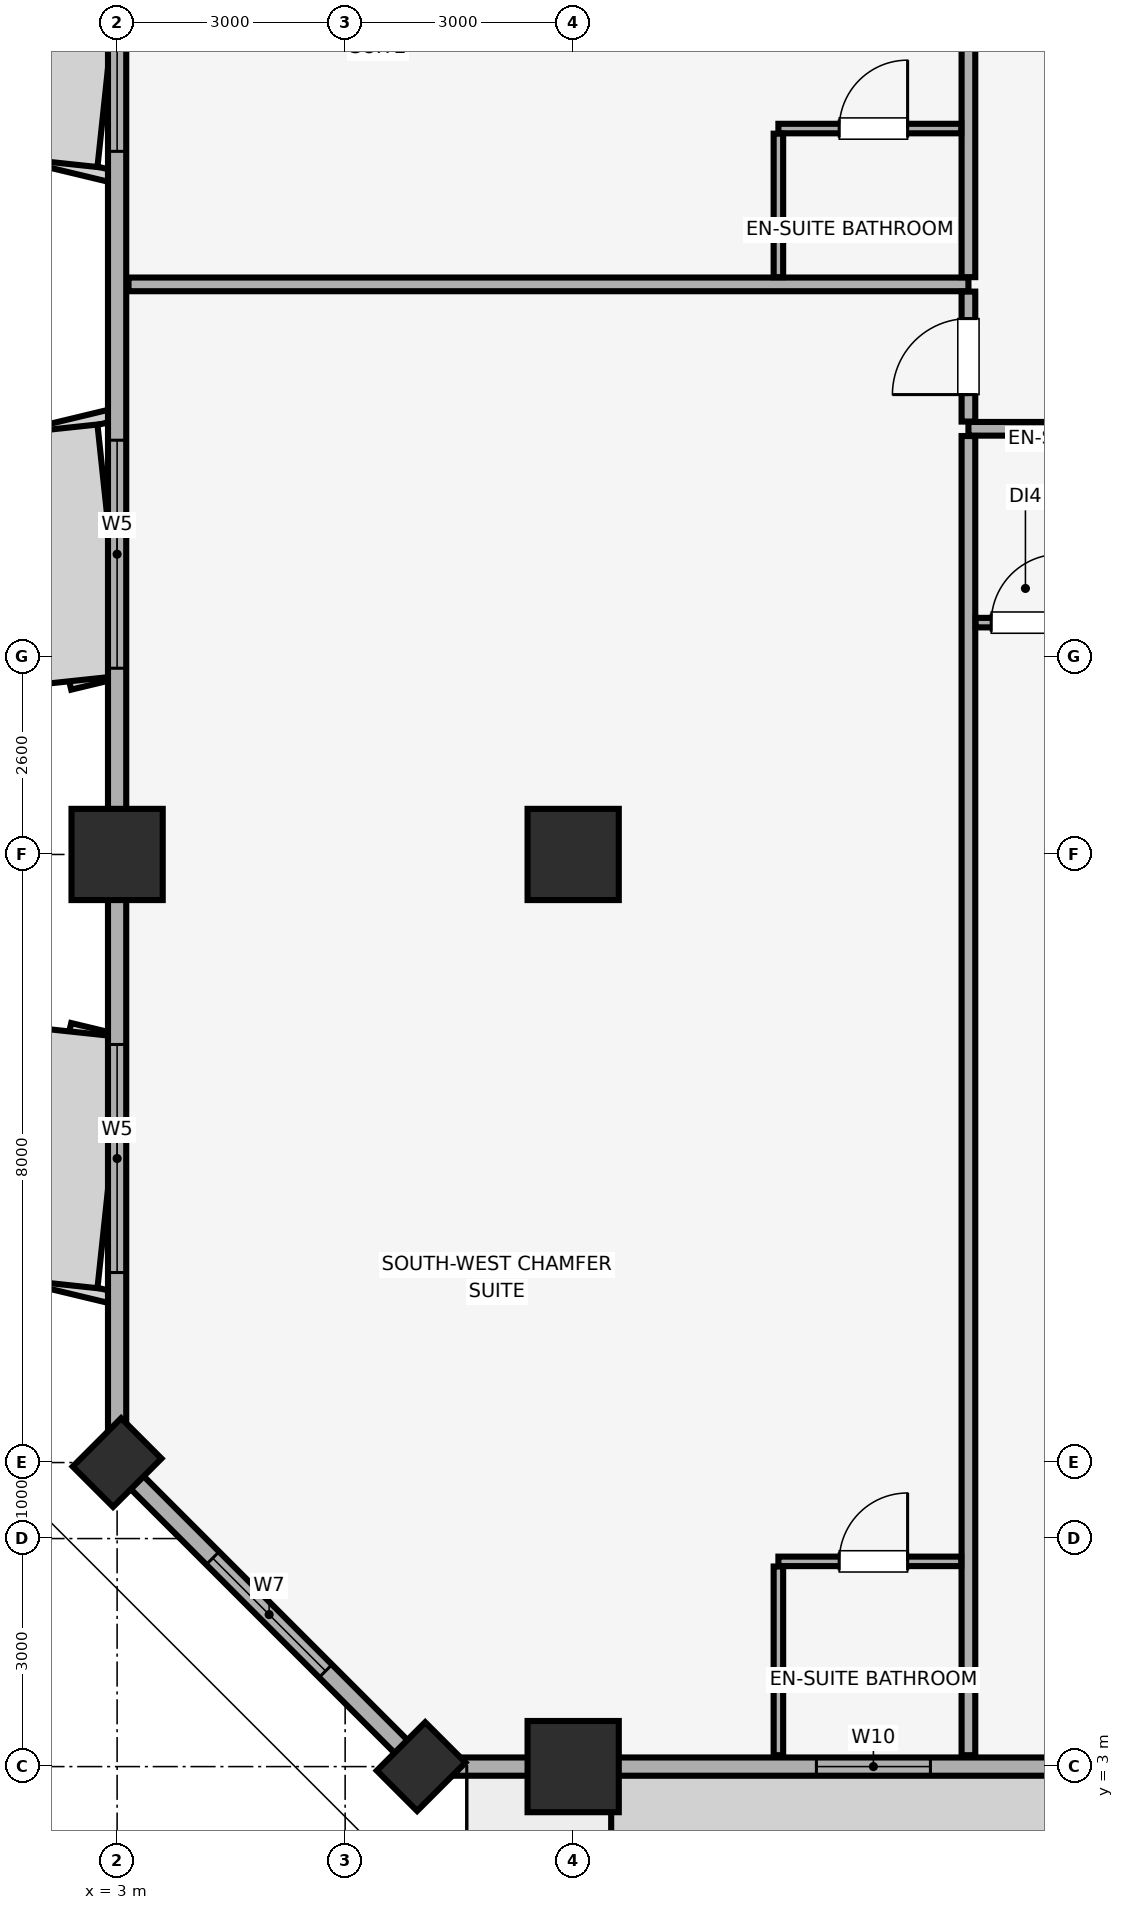
"""IFC4 building model, lengths in metres.
Left out: names, types, materials, properties, quantities, classifications, styles, units other than length and angle.
Written with IfcOpenShell. Run it as: python <this file> out.ifc"""

import sys

from ifc_helpers import new_model, si_unit, direction, frame, frame_2d, origin, origin_2d, place, context, subcontext, project, spatial, rectangle, extrude, element, fill, save


model = new_model("IFC4")
c1 = context("Model", 3, precision=1e-05, world=origin(), true_north=direction((0.0, 1.0)))
c2 = subcontext(c1, "Body", "Model", "MODEL_VIEW")
j1 = project(units=[si_unit("LENGTHUNIT", "METRE"), si_unit("PLANEANGLEUNIT", "RADIAN")], contexts=[c1])
p1 = place(None, origin())
s1 = spatial("IfcSite", under=j1, at=p1, CompositionType="ELEMENT")
p2 = place(p1, origin())
s2 = spatial("IfcBuilding", under=s1, at=p2, CompositionType="ELEMENT")
p3 = place(p2, frame((0.0, 0.0, 180.95)))
s3 = spatial("IfcBuildingStorey", under=s2, at=p3, CompositionType="ELEMENT", Elevation=180.95)
for number, where, z_axis, x_axis in (
    (1, (9.0, 3.0, 0.0), (0.0, 0.0, 1.0), (1.0, 0.0, 0.0)),
    (2, (3.0, 15.0, 0.0), (0.0, 0.0, 1.0), (1.0, 0.0, 0.0)),
):
    element("IfcColumn", number, at=place(p3, frame(where, z_axis=z_axis, x_axis=x_axis)), inside=s3, PredefinedType="COLUMN", context=c2, shape_type="SweptSolid", body=[
        extrude(rectangle(XDim=1.2, YDim=1.2, at=origin_2d()), origin(), (0.0, 0.0, 1.0), 3.45),
    ])
for number, where, z_axis, x_axis in (
    (3, (7.0, 3.0, 0.0), (0.0, 0.0, 1.0), (0.707, 0.707, 0.0)),
    (4, (3.0, 7.0, 0.0), (0.0, 0.0, 1.0), (0.707, 0.707, 0.0)),
):
    element("IfcColumn", number, at=place(p3, frame(where, z_axis=z_axis, x_axis=x_axis)), inside=s3, PredefinedType="PILASTER", context=c2, shape_type="SweptSolid", body=[
        extrude(rectangle(XDim=0.9, YDim=0.75, at=origin_2d()), origin(), (0.0, 0.0, 1.0), 3.45),
    ])
p4 = place(p3, frame((9.0, 15.0, 0.0), z_axis=(0.0, 0.0, 1.0), x_axis=(1.0, 0.0, 0.0)))
e5 = element("IfcColumn", 5, at=p4, inside=s3, PredefinedType="COLUMN", context=c2, shape_type="SweptSolid", body=[
    extrude(rectangle(XDim=1.2, YDim=1.2, at=origin_2d()), origin(), (0.0, 0.0, 1.0), 3.45),
])
p5 = place(p3, frame((7.0, 3.0, 0.0), z_axis=(0.0, 0.0, 1.0), x_axis=(1.0, 0.0, 0.0)))
e6 = element("IfcWall", 6, at=p5, inside=s3, PredefinedType="SOLIDWALL", context=c2, shape_type="SweptSolid", body=[
    extrude(rectangle(XDim=70.0, YDim=0.24, at=frame_2d((35.0, 0.0))), origin(), (0.0, 0.0, 1.0), 2.65),
])
p6 = place(p5, frame((11.383, 0.0, 0.0)))
e7 = element("IfcOpeningElement", 7, at=p6, cuts=e6, PredefinedType="OPENING", context=c2, shape_type="SweptSolid", body=[
    extrude(rectangle(XDim=1.1, YDim=2.15, at=frame_2d((0.55, 1.075))), frame((0.0, 0.13, 0.0), z_axis=(0.0, -1.0, 0.0), x_axis=(1.0, 0.0, 0.0)), (0.0, 0.0, 1.0), 0.26),
])
p7 = place(p5, frame((34.45, 0.0, 0.0)))
e8 = element("IfcOpeningElement", 8, at=p7, cuts=e6, PredefinedType="OPENING", context=c2, shape_type="SweptSolid", body=[
    extrude(rectangle(XDim=1.1, YDim=2.15, at=frame_2d((0.55, 1.075))), frame((0.0, 0.13, 0.0), z_axis=(0.0, -1.0, 0.0), x_axis=(1.0, 0.0, 0.0)), (0.0, 0.0, 1.0), 0.26),
])
p8 = place(p5, frame((57.517, 0.0, 0.0)))
e9 = element("IfcOpeningElement", 9, at=p8, cuts=e6, PredefinedType="OPENING", context=c2, shape_type="SweptSolid", body=[
    extrude(rectangle(XDim=1.1, YDim=2.15, at=frame_2d((0.55, 1.075))), frame((0.0, 0.13, 0.0), z_axis=(0.0, -1.0, 0.0), x_axis=(1.0, 0.0, 0.0)), (0.0, 0.0, 1.0), 0.26),
])
p9 = place(p5, frame((5.2, 0.0, 0.85)))
e10 = element("IfcOpeningElement", 10, at=p9, cuts=e6, PredefinedType="OPENING", context=c2, shape_type="SweptSolid", body=[
    extrude(rectangle(XDim=1.5, YDim=1.4, at=frame_2d((0.75, 0.7))), frame((0.0, 0.13, 0.0), z_axis=(0.0, -1.0, 0.0), x_axis=(1.0, 0.0, 0.0)), (0.0, 0.0, 1.0), 0.26),
])
p10 = place(p5, frame((13.133, 0.0, 0.85)))
e11 = element("IfcOpeningElement", 11, at=p10, cuts=e6, PredefinedType="OPENING", context=c2, shape_type="SweptSolid", body=[
    extrude(rectangle(XDim=1.5, YDim=1.4, at=frame_2d((0.75, 0.7))), frame((0.0, 0.13, 0.0), z_axis=(0.0, -1.0, 0.0), x_axis=(1.0, 0.0, 0.0)), (0.0, 0.0, 1.0), 0.26),
])
p11 = place(p5, frame((17.812, 0.0, 0.85)))
e12 = element("IfcOpeningElement", 12, at=p11, cuts=e6, PredefinedType="OPENING", context=c2, shape_type="SweptSolid", body=[
    extrude(rectangle(XDim=4.2, YDim=1.65, at=frame_2d((2.1, 0.825))), frame((0.0, 0.13, 0.0), z_axis=(0.0, -1.0, 0.0), x_axis=(1.0, 0.0, 0.0)), (0.0, 0.0, 1.0), 0.26),
])
p12 = place(p5, frame((25.1, 0.0, 0.85)))
e13 = element("IfcOpeningElement", 13, at=p12, cuts=e6, PredefinedType="OPENING", context=c2, shape_type="SweptSolid", body=[
    extrude(rectangle(XDim=4.2, YDim=1.65, at=frame_2d((2.1, 0.825))), frame((0.0, 0.13, 0.0), z_axis=(0.0, -1.0, 0.0), x_axis=(1.0, 0.0, 0.0)), (0.0, 0.0, 1.0), 0.26),
])
p13 = place(p5, frame((31.99, 0.0, 0.85)))
e14 = element("IfcOpeningElement", 14, at=p13, cuts=e6, PredefinedType="OPENING", context=c2, shape_type="SweptSolid", body=[
    extrude(rectangle(XDim=1.5, YDim=1.4, at=frame_2d((0.75, 0.7))), frame((0.0, 0.13, 0.0), z_axis=(0.0, -1.0, 0.0), x_axis=(1.0, 0.0, 0.0)), (0.0, 0.0, 1.0), 0.26),
])
p14 = place(p5, frame((36.51, 0.0, 0.85)))
e15 = element("IfcOpeningElement", 15, at=p14, cuts=e6, PredefinedType="OPENING", context=c2, shape_type="SweptSolid", body=[
    extrude(rectangle(XDim=1.5, YDim=1.4, at=frame_2d((0.75, 0.7))), frame((0.0, 0.13, 0.0), z_axis=(0.0, -1.0, 0.0), x_axis=(1.0, 0.0, 0.0)), (0.0, 0.0, 1.0), 0.26),
])
p15 = place(p5, frame((40.7, 0.0, 0.85)))
e16 = element("IfcOpeningElement", 16, at=p15, cuts=e6, PredefinedType="OPENING", context=c2, shape_type="SweptSolid", body=[
    extrude(rectangle(XDim=4.2, YDim=1.65, at=frame_2d((2.1, 0.825))), frame((0.0, 0.13, 0.0), z_axis=(0.0, -1.0, 0.0), x_axis=(1.0, 0.0, 0.0)), (0.0, 0.0, 1.0), 0.26),
])
p16 = place(p5, frame((47.9, 0.0, 0.85)))
e17 = element("IfcOpeningElement", 17, at=p16, cuts=e6, PredefinedType="OPENING", context=c2, shape_type="SweptSolid", body=[
    extrude(rectangle(XDim=4.2, YDim=1.65, at=frame_2d((2.1, 0.825))), frame((0.0, 0.13, 0.0), z_axis=(0.0, -1.0, 0.0), x_axis=(1.0, 0.0, 0.0)), (0.0, 0.0, 1.0), 0.26),
])
p17 = place(p5, frame((55.314, 0.0, 0.85)))
e18 = element("IfcOpeningElement", 18, at=p17, cuts=e6, PredefinedType="OPENING", context=c2, shape_type="SweptSolid", body=[
    extrude(rectangle(XDim=1.5, YDim=1.4, at=frame_2d((0.75, 0.7))), frame((0.0, 0.13, 0.0), z_axis=(0.0, -1.0, 0.0), x_axis=(1.0, 0.0, 0.0)), (0.0, 0.0, 1.0), 0.26),
])
p18 = place(p5, frame((63.3, 0.0, 0.85)))
e19 = element("IfcOpeningElement", 19, at=p18, cuts=e6, PredefinedType="OPENING", context=c2, shape_type="SweptSolid", body=[
    extrude(rectangle(XDim=1.5, YDim=1.4, at=frame_2d((0.75, 0.7))), frame((0.0, 0.13, 0.0), z_axis=(0.0, -1.0, 0.0), x_axis=(1.0, 0.0, 0.0)), (0.0, 0.0, 1.0), 0.26),
])
p19 = place(p3, frame((3.0, 45.0, 0.0), z_axis=(0.0, 0.0, 1.0), x_axis=(0.0, -1.0, 0.0)))
e20 = element("IfcWall", 20, at=p19, inside=s3, PredefinedType="SOLIDWALL", context=c2, shape_type="SweptSolid", body=[
    extrude(rectangle(XDim=38.0, YDim=0.24, at=frame_2d((19.0, 0.0))), origin(), (0.0, 0.0, 1.0), 2.65),
])
p20 = place(p19, frame((32.5, 0.0, 0.85)))
e21 = element("IfcOpeningElement", 21, at=p20, cuts=e20, PredefinedType="OPENING", context=c2, shape_type="SweptSolid", body=[
    extrude(rectangle(XDim=3.0, YDim=1.5, at=frame_2d((1.5, 0.75))), frame((0.0, 0.13, 0.0), z_axis=(0.0, -1.0, 0.0), x_axis=(1.0, 0.0, 0.0)), (0.0, 0.0, 1.0), 0.26),
])
p21 = place(p19, frame((24.55, 0.0, 0.85)))
e22 = element("IfcOpeningElement", 22, at=p21, cuts=e20, PredefinedType="OPENING", context=c2, shape_type="SweptSolid", body=[
    extrude(rectangle(XDim=3.0, YDim=1.5, at=frame_2d((1.5, 0.75))), frame((0.0, 0.13, 0.0), z_axis=(0.0, -1.0, 0.0), x_axis=(1.0, 0.0, 0.0)), (0.0, 0.0, 1.0), 0.26),
])
p22 = place(p19, frame((17.75, 0.0, 0.85)))
e23 = element("IfcOpeningElement", 23, at=p22, cuts=e20, PredefinedType="OPENING", context=c2, shape_type="SweptSolid", body=[
    extrude(rectangle(XDim=3.0, YDim=1.5, at=frame_2d((1.5, 0.75))), frame((0.0, 0.13, 0.0), z_axis=(0.0, -1.0, 0.0), x_axis=(1.0, 0.0, 0.0)), (0.0, 0.0, 1.0), 0.26),
])
p23 = place(p19, frame((9.85, 0.0, 0.85)))
e24 = element("IfcOpeningElement", 24, at=p23, cuts=e20, PredefinedType="OPENING", context=c2, shape_type="SweptSolid", body=[
    extrude(rectangle(XDim=3.0, YDim=1.5, at=frame_2d((1.5, 0.75))), frame((0.0, 0.13, 0.0), z_axis=(0.0, -1.0, 0.0), x_axis=(1.0, 0.0, 0.0)), (0.0, 0.0, 1.0), 0.26),
])
p24 = place(p19, frame((1.085, 0.0, 0.85)))
e25 = element("IfcOpeningElement", 25, at=p24, cuts=e20, PredefinedType="OPENING", context=c2, shape_type="SweptSolid", body=[
    extrude(rectangle(XDim=3.0, YDim=1.5, at=frame_2d((1.5, 0.75))), frame((0.0, 0.13, 0.0), z_axis=(0.0, -1.0, 0.0), x_axis=(1.0, 0.0, 0.0)), (0.0, 0.0, 1.0), 0.26),
])
p25 = place(p3, frame((3.0, 7.0, 0.0), z_axis=(0.0, 0.0, 1.0), x_axis=(0.707106781187, -0.707106781187, 0.0)))
e26 = element("IfcWall", 26, at=p25, inside=s3, PredefinedType="SOLIDWALL", context=c2, shape_type="SweptSolid", body=[
    extrude(rectangle(XDim=5.657, YDim=0.24, at=frame_2d((2.828, 0.0))), origin(), (0.0, 0.0, 1.0), 2.65),
])
p26 = place(p25, frame((1.778, 0.0, 0.85)))
e27 = element("IfcOpeningElement", 27, at=p26, cuts=e26, PredefinedType="OPENING", context=c2, shape_type="SweptSolid", body=[
    extrude(rectangle(XDim=2.1, YDim=1.6, at=frame_2d((1.05, 0.8))), frame((0.0, 0.13, 0.0), z_axis=(0.0, -1.0, 0.0), x_axis=(1.0, 0.0, 0.0)), (0.0, 0.0, 1.0), 0.26),
])
p27 = place(p3, frame((14.2, 20.6, 0.0), z_axis=(0.0, 0.0, 1.0), x_axis=(1.0, 0.0, 0.0)))
e28 = element("IfcWall", 28, at=p27, inside=s3, PredefinedType="PARTITIONING", context=c2, shape_type="SweptSolid", body=[
    extrude(rectangle(XDim=7.912, YDim=0.18, at=frame_2d((3.956, 0.0))), origin(), (0.0, 0.0, 1.0), 3.45),
])
p28 = place(p27, frame((5.156, 0.0, 0.0)))
e29 = element("IfcOpeningElement", 29, at=p28, cuts=e28, PredefinedType="OPENING", context=c2, shape_type="SweptSolid", body=[
    extrude(rectangle(XDim=1.0, YDim=2.15, at=frame_2d((0.5, 1.075))), frame((0.0, 0.1, 0.0), z_axis=(0.0, -1.0, 0.0), x_axis=(1.0, 0.0, 0.0)), (0.0, 0.0, 1.0), 0.2),
])
p29 = place(p3, frame((14.2, 3.15, 0.0), z_axis=(0.0, 0.0, 1.0), x_axis=(0.0, 1.0, 0.0)))
e30 = element("IfcWall", 30, at=p29, inside=s3, PredefinedType="PARTITIONING", context=c2, shape_type="SweptSolid", body=[
    extrude(rectangle(XDim=17.355, YDim=0.18, at=frame_2d((8.677, 0.0))), origin(), (0.0, 0.0, 1.0), 3.45),
])
p30 = place(p3, frame((14.295, 18.05, 0.0), z_axis=(0.0, 0.0, 1.0), x_axis=(1.0, 0.0, 0.0)))
e31 = element("IfcWall", 31, at=p30, inside=s3, PredefinedType="PARTITIONING", context=c2, shape_type="SweptSolid", body=[
    extrude(rectangle(XDim=2.405, YDim=0.125, at=frame_2d((1.203, 0.0))), origin(), (0.0, 0.0, 1.0), 3.45),
])
p31 = place(p30, frame((0.205, 0.0, 0.0)))
e32 = element("IfcOpeningElement", 32, at=p31, cuts=e31, PredefinedType="OPENING", context=c2, shape_type="SweptSolid", body=[
    extrude(rectangle(XDim=0.9, YDim=2.1, at=frame_2d((0.45, 1.05))), frame((0.0, 0.073, 0.0), z_axis=(0.0, -1.0, 0.0), x_axis=(1.0, 0.0, 0.0)), (0.0, 0.0, 1.0), 0.145),
])
p32 = place(p3, frame((3.15, 22.5, 0.0), z_axis=(0.0, 0.0, 1.0), x_axis=(1.0, 0.0, 0.0)))
e33 = element("IfcWall", 33, at=p32, inside=s3, PredefinedType="PARTITIONING", context=c2, shape_type="SweptSolid", body=[
    extrude(rectangle(XDim=11.05, YDim=0.18, at=frame_2d((5.525, 0.0))), origin(), (0.0, 0.0, 1.0), 3.45),
])
p33 = place(p3, frame((14.2, 20.695, 0.0), z_axis=(0.0, 0.0, 1.0), x_axis=(0.0, 1.0, 0.0)))
e34 = element("IfcWall", 34, at=p33, inside=s3, PredefinedType="PARTITIONING", context=c2, shape_type="SweptSolid", body=[
    extrude(rectangle(XDim=1.71, YDim=0.18, at=frame_2d((0.855, 0.0))), origin(), (0.0, 0.0, 1.0), 3.45),
])
p34 = place(p33, frame((0.355, 0.0, 0.0)))
e35 = element("IfcOpeningElement", 35, at=p34, cuts=e34, PredefinedType="OPENING", context=c2, shape_type="SweptSolid", body=[
    extrude(rectangle(XDim=1.0, YDim=2.15, at=frame_2d((0.5, 1.075))), frame((0.0, 0.1, 0.0), z_axis=(0.0, -1.0, 0.0), x_axis=(1.0, 0.0, 0.0)), (0.0, 0.0, 1.0), 0.2),
])
p35 = place(p3, frame((11.7, 5.7, 0.0), z_axis=(0.0, 0.0, 1.0), x_axis=(1.0, 0.0, 0.0)))
e36 = element("IfcWall", 36, at=p35, inside=s3, PredefinedType="PARTITIONING", context=c2, shape_type="SweptSolid", body=[
    extrude(rectangle(XDim=2.405, YDim=0.125, at=frame_2d((1.203, 0.0))), origin(), (0.0, 0.0, 1.0), 3.45),
])
p36 = place(p35, frame((0.8, 0.0, 0.0)))
e37 = element("IfcOpeningElement", 37, at=p36, cuts=e36, PredefinedType="OPENING", context=c2, shape_type="SweptSolid", body=[
    extrude(rectangle(XDim=0.9, YDim=2.1, at=frame_2d((0.45, 1.05))), frame((0.0, 0.073, 0.0), z_axis=(0.0, -1.0, 0.0), x_axis=(1.0, 0.0, 0.0)), (0.0, 0.0, 1.0), 0.145),
])
p37 = place(p3, frame((11.7, 3.15, 0.0), z_axis=(0.0, 0.0, 1.0), x_axis=(0.0, 1.0, 0.0)))
e38 = element("IfcWall", 38, at=p37, inside=s3, PredefinedType="PARTITIONING", context=c2, shape_type="SweptSolid", body=[
    extrude(rectangle(XDim=2.483, YDim=0.125, at=frame_2d((1.241, 0.0))), origin(), (0.0, 0.0, 1.0), 3.45),
])
p38 = place(p3, frame((14.2, 22.595, 0.0), z_axis=(0.0, 0.0, 1.0), x_axis=(0.0, 1.0, 0.0)))
e39 = element("IfcWall", 39, at=p38, inside=s3, PredefinedType="PARTITIONING", context=c2, shape_type="SweptSolid", body=[
    extrude(rectangle(XDim=6.71, YDim=0.18, at=frame_2d((3.355, 0.0))), origin(), (0.0, 0.0, 1.0), 3.45),
])
p39 = place(p38, frame((3.94, 0.0, 0.0)))
e40 = element("IfcOpeningElement", 40, at=p39, cuts=e39, PredefinedType="OPENING", context=c2, shape_type="SweptSolid", body=[
    extrude(rectangle(XDim=1.0, YDim=2.15, at=frame_2d((0.5, 1.075))), frame((0.0, 0.1, 0.0), z_axis=(0.0, -1.0, 0.0), x_axis=(1.0, 0.0, 0.0)), (0.0, 0.0, 1.0), 0.2),
])
p40 = place(p3, frame((11.7, 24.55, 0.0), z_axis=(0.0, 0.0, 1.0), x_axis=(1.0, 0.0, 0.0)))
e41 = element("IfcWall", 41, at=p40, inside=s3, PredefinedType="PARTITIONING", context=c2, shape_type="SweptSolid", body=[
    extrude(rectangle(XDim=2.405, YDim=0.125, at=frame_2d((1.203, 0.0))), origin(), (0.0, 0.0, 1.0), 3.45),
])
p41 = place(p40, frame((0.8, 0.0, 0.0)))
e42 = element("IfcOpeningElement", 42, at=p41, cuts=e41, PredefinedType="OPENING", context=c2, shape_type="SweptSolid", body=[
    extrude(rectangle(XDim=0.9, YDim=2.1, at=frame_2d((0.45, 1.05))), frame((0.0, 0.073, 0.0), z_axis=(0.0, -1.0, 0.0), x_axis=(1.0, 0.0, 0.0)), (0.0, 0.0, 1.0), 0.145),
])
p42 = place(p3, frame((11.7, 22.595, 0.0), z_axis=(0.0, 0.0, 1.0), x_axis=(0.0, 1.0, 0.0)))
e43 = element("IfcWall", 43, at=p42, inside=s3, PredefinedType="PARTITIONING", context=c2, shape_type="SweptSolid", body=[
    extrude(rectangle(XDim=1.887, YDim=0.125, at=frame_2d((0.944, 0.0))), origin(), (0.0, 0.0, 1.0), 3.45),
])
p43 = place(p26, origin())
e44 = element("IfcWindow", 44, at=p43, inside=s3, PartitioningType="SINGLE_PANEL", PredefinedType="WINDOW", context=c2, shape_type="SweptSolid", body=[
    extrude(rectangle(XDim=2.1, YDim=1.6, at=frame_2d((1.05, 0.8))), frame((0.0, 0.03, 0.0), z_axis=(0.0, -1.0, 0.0), x_axis=(1.0, 0.0, 0.0)), (0.0, 0.0, 1.0), 0.06),
])
fill(e27, e44)
p44 = place(p9, origin())
e45 = element("IfcWindow", 45, at=p44, inside=s3, PartitioningType="SINGLE_PANEL", PredefinedType="WINDOW", context=c2, shape_type="SweptSolid", body=[
    extrude(rectangle(XDim=1.5, YDim=1.4, at=frame_2d((0.75, 0.7))), frame((0.0, 0.03, 0.0), z_axis=(0.0, -1.0, 0.0), x_axis=(1.0, 0.0, 0.0)), (0.0, 0.0, 1.0), 0.06),
])
fill(e10, e45)
p45 = place(p20, origin())
e46 = element("IfcWindow", 46, at=p45, inside=s3, PartitioningType="SINGLE_PANEL", PredefinedType="WINDOW", context=c2, shape_type="SweptSolid", body=[
    extrude(rectangle(XDim=3.0, YDim=1.5, at=frame_2d((1.5, 0.75))), frame((0.0, 0.03, 0.0), z_axis=(0.0, -1.0, 0.0), x_axis=(1.0, 0.0, 0.0)), (0.0, 0.0, 1.0), 0.06),
])
fill(e21, e46)
p46 = place(p21, origin())
e47 = element("IfcWindow", 47, at=p46, inside=s3, PartitioningType="SINGLE_PANEL", PredefinedType="WINDOW", context=c2, shape_type="SweptSolid", body=[
    extrude(rectangle(XDim=3.0, YDim=1.5, at=frame_2d((1.5, 0.75))), frame((0.0, 0.03, 0.0), z_axis=(0.0, -1.0, 0.0), x_axis=(1.0, 0.0, 0.0)), (0.0, 0.0, 1.0), 0.06),
])
fill(e22, e47)
p47 = place(p22, origin())
e48 = element("IfcWindow", 48, at=p47, inside=s3, PartitioningType="SINGLE_PANEL", PredefinedType="WINDOW", context=c2, shape_type="SweptSolid", body=[
    extrude(rectangle(XDim=3.0, YDim=1.5, at=frame_2d((1.5, 0.75))), frame((0.0, 0.03, 0.0), z_axis=(0.0, -1.0, 0.0), x_axis=(1.0, 0.0, 0.0)), (0.0, 0.0, 1.0), 0.06),
])
fill(e23, e48)
p48 = place(p31, origin())
e49 = element("IfcDoor", 49, at=p48, inside=s3, OperationType="SINGLE_SWING_RIGHT", PredefinedType="DOOR", context=c2, shape_type="SweptSolid", body=[
    extrude(rectangle(XDim=0.9, YDim=2.1, at=frame_2d((0.45, 1.05))), frame((0.0, 0.025, 0.0), z_axis=(0.0, -1.0, 0.0), x_axis=(1.0, 0.0, 0.0)), (0.0, 0.0, 1.0), 0.05),
])
fill(e32, e49)
p49 = place(p34, origin())
e50 = element("IfcDoor", 50, at=p49, inside=s3, OperationType="SINGLE_SWING_LEFT", PredefinedType="DOOR", context=c2, shape_type="SweptSolid", body=[
    extrude(rectangle(XDim=1.0, YDim=2.15, at=frame_2d((0.5, 1.075))), frame((0.0, 0.025, 0.0), z_axis=(0.0, -1.0, 0.0), x_axis=(1.0, 0.0, 0.0)), (0.0, 0.0, 1.0), 0.05),
])
fill(e35, e50)
p50 = place(p36, origin())
e51 = element("IfcDoor", 51, at=p50, inside=s3, OperationType="SINGLE_SWING_RIGHT", PredefinedType="DOOR", context=c2, shape_type="SweptSolid", body=[
    extrude(rectangle(XDim=0.9, YDim=2.1, at=frame_2d((0.45, 1.05))), frame((0.0, 0.025, 0.0), z_axis=(0.0, -1.0, 0.0), x_axis=(1.0, 0.0, 0.0)), (0.0, 0.0, 1.0), 0.05),
])
fill(e37, e51)
p51 = place(p41, origin())
e52 = element("IfcDoor", 52, at=p51, inside=s3, OperationType="SINGLE_SWING_RIGHT", PredefinedType="DOOR", context=c2, shape_type="SweptSolid", body=[
    extrude(rectangle(XDim=0.9, YDim=2.1, at=frame_2d((0.45, 1.05))), frame((0.0, 0.025, 0.0), z_axis=(0.0, -1.0, 0.0), x_axis=(1.0, 0.0, 0.0)), (0.0, 0.0, 1.0), 0.05),
])
fill(e42, e52)
save(model, sys.argv[1])
